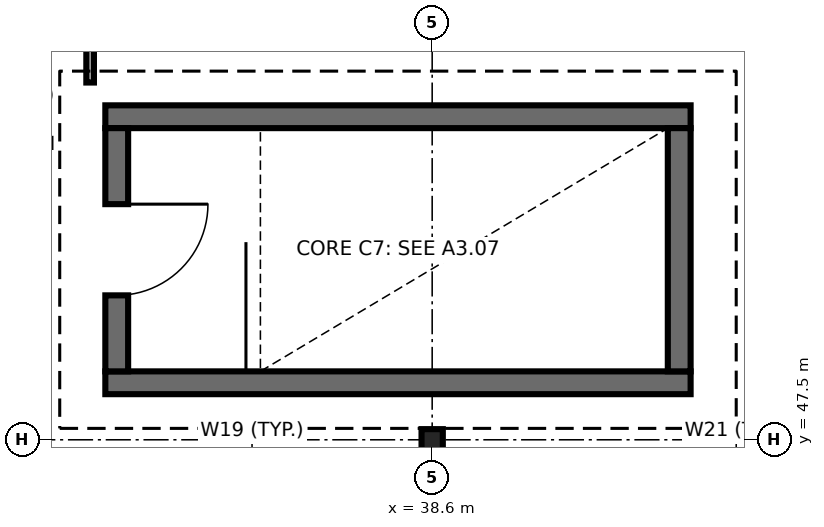
"""IFC4 building model, lengths in metres.
Left out: names, types, materials, properties, quantities, classifications, styles, units other than length and angle.
Written with IfcOpenShell. Run it as: python <this file> out.ifc"""

import sys

from ifc_helpers import new_model, si_unit, direction, frame, frame_2d, origin, origin_2d, place, context, subcontext, project, spatial, rectangle, i_section, extrude, element, fill, save


model = new_model("IFC4")
c1 = context("Model", 3, precision=1e-05, world=origin(), true_north=direction((0.0, 1.0)))
c2 = subcontext(c1, "Body", "Model", "MODEL_VIEW")
j1 = project(units=[si_unit("LENGTHUNIT", "METRE"), si_unit("PLANEANGLEUNIT", "RADIAN")], contexts=[c1])
p1 = place(None, origin())
s1 = spatial("IfcSite", under=j1, at=p1, CompositionType="ELEMENT")
p2 = place(p1, origin())
s2 = spatial("IfcBuilding", under=s1, at=p2, CompositionType="ELEMENT")
p3 = place(p2, frame((0.0, 0.0, 30.6)))
s3 = spatial("IfcBuildingStorey", under=s2, at=p3, CompositionType="ELEMENT", Elevation=30.6)
p4 = place(p3, frame((38.6, 47.5, 0.0), z_axis=(0.0, 0.0, 1.0), x_axis=(1.0, 0.0, 0.0)))
e1 = element("IfcColumn", 1, at=p4, inside=s3, PredefinedType="COLUMN", context=c2, shape_type="SweptSolid", body=[
    extrude(i_section(OverallWidth=0.28, OverallDepth=0.28, WebThickness=0.01, FlangeThickness=0.018, FilletRadius=0.024, at=origin_2d()), origin(), (0.0, 0.0, 1.0), 3.9),
])
for number, where, z_axis, x_axis in (
    (2, (34.3, 48.25, 0.0), (0.0, 0.0, 1.0), (1.0, 0.0, 0.0)),
    (3, (42.0, 51.75, 0.0), (0.0, 0.0, 1.0), (-1.0, 0.0, 0.0)),
):
    element("IfcWall", number, at=place(p3, frame(where, z_axis=z_axis, x_axis=x_axis)), inside=s3, PredefinedType="SHEAR", context=c2, shape_type="SweptSolid", body=[
        extrude(rectangle(XDim=7.7, YDim=0.3, at=frame_2d((3.85, 0.0))), origin(), (0.0, 0.0, 1.0), 3.9),
    ])
p5 = place(p3, frame((34.45, 51.6, 0.0), z_axis=(0.0, 0.0, 1.0), x_axis=(0.0, -1.0, 0.0)))
e4 = element("IfcWall", 4, at=p5, inside=s3, PredefinedType="SHEAR", context=c2, shape_type="SweptSolid", body=[
    extrude(rectangle(XDim=3.2, YDim=0.3, at=frame_2d((1.6, 0.0))), origin(), (0.0, 0.0, 1.0), 3.9),
])
p6 = place(p5, frame((1.0, 0.0, 0.0)))
e5 = element("IfcOpeningElement", 5, at=p6, cuts=e4, PredefinedType="OPENING", context=c2, shape_type="SweptSolid", body=[
    extrude(rectangle(XDim=1.2, YDim=2.15, at=frame_2d((0.6, 1.075))), frame((0.0, 0.16, 0.0), z_axis=(0.0, -1.0, 0.0), x_axis=(1.0, 0.0, 0.0)), (0.0, 0.0, 1.0), 0.32),
])
p7 = place(p3, frame((41.85, 48.4, 0.0), z_axis=(0.0, 0.0, 1.0), x_axis=(0.0, 1.0, 0.0)))
e6 = element("IfcWall", 6, at=p7, inside=s3, PredefinedType="SHEAR", context=c2, shape_type="SweptSolid", body=[
    extrude(rectangle(XDim=3.2, YDim=0.3, at=frame_2d((1.6, 0.0))), origin(), (0.0, 0.0, 1.0), 3.9),
])
p8 = place(p3, frame((34.1, 52.2, 0.0), z_axis=(0.0, 0.0, 1.0), x_axis=(0.0, 1.0, 0.0)))
e7 = element("IfcWall", 7, at=p8, inside=s3, PredefinedType="PARTITIONING", context=c2, shape_type="SweptSolid", body=[
    extrude(rectangle(XDim=5.4, YDim=0.1, at=frame_2d((2.7, 0.0))), origin(), (0.0, 0.0, 1.0), 3.7),
])
p9 = place(p8, frame((2.225, 0.0, 0.0)))
e8 = element("IfcOpeningElement", 8, at=p9, cuts=e7, PredefinedType="OPENING", context=c2, shape_type="SweptSolid", body=[
    extrude(rectangle(XDim=0.95, YDim=2.1, at=frame_2d((0.475, 1.05))), frame((0.0, 0.06, 0.0), z_axis=(0.0, -1.0, 0.0), x_axis=(1.0, 0.0, 0.0)), (0.0, 0.0, 1.0), 0.12),
])
p10 = place(p6, origin())
e9 = element("IfcDoor", 9, at=p10, inside=s3, OperationType="SINGLE_SWING_LEFT", PredefinedType="DOOR", context=c2, shape_type="SweptSolid", body=[
    extrude(rectangle(XDim=1.2, YDim=2.15, at=frame_2d((0.6, 1.075))), frame((0.0, 0.025, 0.0), z_axis=(0.0, -1.0, 0.0), x_axis=(1.0, 0.0, 0.0)), (0.0, 0.0, 1.0), 0.05),
])
fill(e5, e9)
save(model, sys.argv[1])
